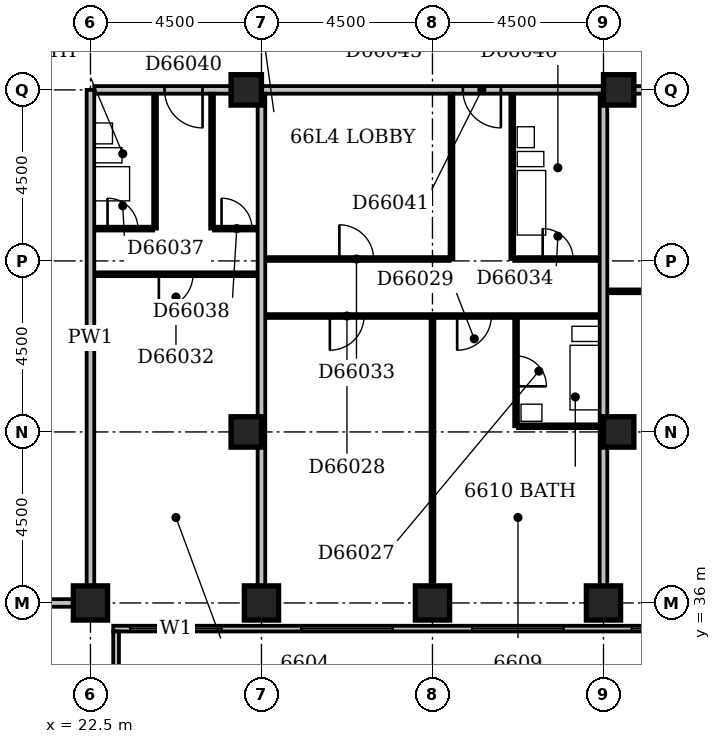
"""IFC4 building model, lengths in metres.
Left out: names, types, materials, properties, quantities, classifications, styles, units other than length and angle.
Written with IfcOpenShell. Run it as: python <this file> out.ifc"""

import sys

from ifc_helpers import new_model, si_unit, direction, frame, frame_2d, origin, origin_2d, place, context, subcontext, project, spatial, rectangle, extrude, element, fill, save


model = new_model("IFC4")
c1 = context("Model", 3, precision=1e-05, world=origin(), true_north=direction((0.0, 1.0)))
c2 = subcontext(c1, "Body", "Model", "MODEL_VIEW")
j1 = project(units=[si_unit("LENGTHUNIT", "METRE"), si_unit("PLANEANGLEUNIT", "RADIAN")], contexts=[c1])
p1 = place(None, origin())
s1 = spatial("IfcSite", under=j1, at=p1, CompositionType="ELEMENT")
p2 = place(p1, origin())
s2 = spatial("IfcBuilding", under=s1, at=p2, CompositionType="ELEMENT")
p3 = place(p2, frame((0.0, 0.0, 254.6)))
s3 = spatial("IfcBuildingStorey", under=s2, at=p3, CompositionType="ELEMENT", Elevation=254.6)
for number, where, z_axis, x_axis in (
    (1, (22.5, 36.0, -0.3), (0.0, 0.0, 1.0), (1.0, 0.0, 0.0)),
    (2, (27.0, 36.0, -0.3), (0.0, 0.0, 1.0), (1.0, 0.0, 0.0)),
    (3, (31.5, 36.0, -0.3), (0.0, 0.0, 1.0), (1.0, 0.0, 0.0)),
    (4, (36.0, 36.0, -0.3), (0.0, 0.0, 1.0), (1.0, 0.0, 0.0)),
):
    element("IfcColumn", number, at=place(p3, frame(where, z_axis=z_axis, x_axis=x_axis)), inside=s3, PredefinedType="COLUMN", context=c2, shape_type="SweptSolid", body=[
        extrude(rectangle(XDim=0.9, YDim=0.9, at=origin_2d()), origin(), (0.0, 0.0, 1.0), 3.45),
    ])
for number, where, z_axis, x_axis in (
    (5, (26.6, 40.5, -0.3), (0.0, 0.0, 1.0), (1.0, 0.0, 0.0)),
    (6, (36.4, 40.5, -0.3), (0.0, 0.0, 1.0), (1.0, 0.0, 0.0)),
    (7, (26.6, 49.5, -0.3), (0.0, 0.0, 1.0), (1.0, 0.0, 0.0)),
    (8, (36.4, 49.5, -0.3), (0.0, 0.0, 1.0), (1.0, 0.0, 0.0)),
):
    element("IfcColumn", number, at=place(p3, frame(where, z_axis=z_axis, x_axis=x_axis)), inside=s3, PredefinedType="COLUMN", context=c2, shape_type="SweptSolid", body=[
        extrude(rectangle(XDim=0.8, YDim=0.8, at=origin_2d()), origin(), (0.0, 0.0, 1.0), 3.45),
    ])
p4 = place(p3, frame((23.175, 17.4, 0.0), z_axis=(0.0, 0.0, 1.0), x_axis=(0.0, 1.0, 0.0)))
e9 = element("IfcWall", 9, at=p4, inside=s3, PredefinedType="STANDARD", context=c2, shape_type="SweptSolid", body=[
    extrude(rectangle(XDim=17.85, YDim=0.15, at=frame_2d((8.925, 0.0))), origin(), (0.0, 0.0, 1.0), 2.7),
])
p5 = place(p4, frame((1.65, 0.0, 0.6)))
e10 = element("IfcOpeningElement", 10, at=p5, cuts=e9, PredefinedType="OPENING", context=c2, shape_type="SweptSolid", body=[
    extrude(rectangle(XDim=2.4, YDim=1.8, at=frame_2d((1.2, 0.9))), frame((0.0, 0.087, 0.0), z_axis=(0.0, -1.0, 0.0), x_axis=(1.0, 0.0, 0.0)), (0.0, 0.0, 1.0), 0.174),
])
p6 = place(p4, frame((6.15, 0.0, 0.6)))
e11 = element("IfcOpeningElement", 11, at=p6, cuts=e9, PredefinedType="OPENING", context=c2, shape_type="SweptSolid", body=[
    extrude(rectangle(XDim=2.4, YDim=1.8, at=frame_2d((1.2, 0.9))), frame((0.0, 0.087, 0.0), z_axis=(0.0, -1.0, 0.0), x_axis=(1.0, 0.0, 0.0)), (0.0, 0.0, 1.0), 0.174),
])
p7 = place(p4, frame((10.65, 0.0, 0.6)))
e12 = element("IfcOpeningElement", 12, at=p7, cuts=e9, PredefinedType="OPENING", context=c2, shape_type="SweptSolid", body=[
    extrude(rectangle(XDim=2.4, YDim=1.8, at=frame_2d((1.2, 0.9))), frame((0.0, 0.087, 0.0), z_axis=(0.0, -1.0, 0.0), x_axis=(1.0, 0.0, 0.0)), (0.0, 0.0, 1.0), 0.174),
])
p8 = place(p4, frame((14.817, 0.0, 0.6)))
e13 = element("IfcOpeningElement", 13, at=p8, cuts=e9, PredefinedType="OPENING", context=c2, shape_type="SweptSolid", body=[
    extrude(rectangle(XDim=0.9, YDim=1.8, at=frame_2d((0.45, 0.9))), frame((0.0, 0.087, 0.0), z_axis=(0.0, -1.0, 0.0), x_axis=(1.0, 0.0, 0.0)), (0.0, 0.0, 1.0), 0.174),
])
p9 = place(p3, frame((23.1, 35.325, 0.0), z_axis=(0.0, 0.0, 1.0), x_axis=(1.0, 0.0, 0.0)))
e14 = element("IfcWall", 14, at=p9, inside=s3, PredefinedType="STANDARD", context=c2, shape_type="SweptSolid", body=[
    extrude(rectangle(XDim=18.15, YDim=0.15, at=frame_2d((9.075, 0.0))), origin(), (0.0, 0.0, 1.0), 2.7),
])
p10 = place(p9, frame((0.45, 0.0, 0.6)))
e15 = element("IfcOpeningElement", 15, at=p10, cuts=e14, PredefinedType="OPENING", context=c2, shape_type="SweptSolid", body=[
    extrude(rectangle(XDim=2.4, YDim=1.8, at=frame_2d((1.2, 0.9))), frame((0.0, 0.087, 0.0), z_axis=(0.0, -1.0, 0.0), x_axis=(1.0, 0.0, 0.0)), (0.0, 0.0, 1.0), 0.174),
])
p11 = place(p9, frame((4.95, 0.0, 0.6)))
e16 = element("IfcOpeningElement", 16, at=p11, cuts=e14, PredefinedType="OPENING", context=c2, shape_type="SweptSolid", body=[
    extrude(rectangle(XDim=2.4, YDim=1.8, at=frame_2d((1.2, 0.9))), frame((0.0, 0.087, 0.0), z_axis=(0.0, -1.0, 0.0), x_axis=(1.0, 0.0, 0.0)), (0.0, 0.0, 1.0), 0.174),
])
p12 = place(p9, frame((9.45, 0.0, 0.6)))
e17 = element("IfcOpeningElement", 17, at=p12, cuts=e14, PredefinedType="OPENING", context=c2, shape_type="SweptSolid", body=[
    extrude(rectangle(XDim=2.4, YDim=1.8, at=frame_2d((1.2, 0.9))), frame((0.0, 0.087, 0.0), z_axis=(0.0, -1.0, 0.0), x_axis=(1.0, 0.0, 0.0)), (0.0, 0.0, 1.0), 0.174),
])
p13 = place(p9, frame((13.646, 0.0, 0.6)))
e18 = element("IfcOpeningElement", 18, at=p13, cuts=e14, PredefinedType="OPENING", context=c2, shape_type="SweptSolid", body=[
    extrude(rectangle(XDim=1.8, YDim=1.8, at=frame_2d((0.9, 0.9))), frame((0.0, 0.087, 0.0), z_axis=(0.0, -1.0, 0.0), x_axis=(1.0, 0.0, 0.0)), (0.0, 0.0, 1.0), 0.174),
])
p14 = place(p3, frame((9.1, 36.0, 0.0), z_axis=(0.0, 0.0, 1.0), x_axis=(1.0, 0.0, 0.0)))
e19 = element("IfcWall", 19, at=p14, inside=s3, PredefinedType="PARTITIONING", context=c2, shape_type="SweptSolid", body=[
    extrude(rectangle(XDim=12.95, YDim=0.2, at=frame_2d((6.475, 0.0))), origin(), (0.0, 0.0, 1.0), 3.15),
])
p15 = place(p3, frame((22.5, 36.45, 0.0), z_axis=(0.0, 0.0, 1.0), x_axis=(0.0, 1.0, 0.0)))
e20 = element("IfcWall", 20, at=p15, inside=s3, PredefinedType="PARTITIONING", context=c2, shape_type="SweptSolid", body=[
    extrude(rectangle(XDim=13.05, YDim=0.2, at=frame_2d((6.525, 0.0))), origin(), (0.0, 0.0, 1.0), 3.15),
])
p16 = place(p3, frame((27.0, 36.45, 0.0), z_axis=(0.0, 0.0, 1.0), x_axis=(0.0, 1.0, 0.0)))
e21 = element("IfcWall", 21, at=p16, inside=s3, PredefinedType="PARTITIONING", context=c2, shape_type="SweptSolid", body=[
    extrude(rectangle(XDim=12.95, YDim=0.2, at=frame_2d((6.475, 0.0))), origin(), (0.0, 0.0, 1.0), 3.15),
])
p17 = place(p3, frame((31.5, 36.45, 0.0), z_axis=(0.0, 0.0, 1.0), x_axis=(0.0, 1.0, 0.0)))
e22 = element("IfcWall", 22, at=p17, inside=s3, PredefinedType="PARTITIONING", context=c2, shape_type="SweptSolid", body=[
    extrude(rectangle(XDim=7.05, YDim=0.1, at=frame_2d((3.525, 0.0))), origin(), (0.0, 0.0, 1.0), 3.15),
])
p18 = place(p3, frame((36.0, 36.45, 0.0), z_axis=(0.0, 0.0, 1.0), x_axis=(0.0, 1.0, 0.0)))
e23 = element("IfcWall", 23, at=p18, inside=s3, PredefinedType="PARTITIONING", context=c2, shape_type="SweptSolid", body=[
    extrude(rectangle(XDim=12.95, YDim=0.2, at=frame_2d((6.475, 0.0))), origin(), (0.0, 0.0, 1.0), 3.15),
])
p19 = place(p3, frame((33.7, 40.65, 0.0), z_axis=(0.0, 0.0, 1.0), x_axis=(0.0, 1.0, 0.0)))
e24 = element("IfcWall", 24, at=p19, inside=s3, PredefinedType="PLUMBINGWALL", context=c2, shape_type="SweptSolid", body=[
    extrude(rectangle(XDim=2.85, YDim=0.1, at=frame_2d((1.425, 0.0))), origin(), (0.0, 0.0, 1.0), 3.15),
])
p20 = place(p19, frame((1.05, 0.0, 0.0)))
e25 = element("IfcOpeningElement", 25, at=p20, cuts=e24, PredefinedType="OPENING", context=c2, shape_type="SweptSolid", body=[
    extrude(rectangle(XDim=0.8, YDim=2.1, at=frame_2d((0.4, 1.05))), frame((0.0, 0.062, 0.0), z_axis=(0.0, -1.0, 0.0), x_axis=(1.0, 0.0, 0.0)), (0.0, 0.0, 1.0), 0.124),
])
p21 = place(p3, frame((33.75, 40.65, 0.0), z_axis=(0.0, 0.0, 1.0), x_axis=(1.0, 0.0, 0.0)))
e26 = element("IfcWall", 26, at=p21, inside=s3, PredefinedType="PLUMBINGWALL", context=c2, shape_type="SweptSolid", body=[
    extrude(rectangle(XDim=2.15, YDim=0.1, at=frame_2d((1.075, 0.0))), origin(), (0.0, 0.0, 1.0), 3.15),
])
p22 = place(p3, frame((27.1, 43.55, 0.0), z_axis=(0.0, 0.0, 1.0), x_axis=(1.0, 0.0, 0.0)))
e27 = element("IfcWall", 27, at=p22, inside=s3, PredefinedType="PARTITIONING", context=c2, shape_type="SweptSolid", body=[
    extrude(rectangle(XDim=8.8, YDim=0.1, at=frame_2d((4.4, 0.0))), origin(), (0.0, 0.0, 1.0), 3.15),
])
p23 = place(p22, frame((1.7, 0.0, 0.0)))
e28 = element("IfcOpeningElement", 28, at=p23, cuts=e27, PredefinedType="OPENING", context=c2, shape_type="SweptSolid", body=[
    extrude(rectangle(XDim=0.9, YDim=2.1, at=frame_2d((0.45, 1.05))), frame((0.0, 0.062, 0.0), z_axis=(0.0, -1.0, 0.0), x_axis=(1.0, 0.0, 0.0)), (0.0, 0.0, 1.0), 0.124),
])
p24 = place(p22, frame((5.05, 0.0, 0.0)))
e29 = element("IfcOpeningElement", 29, at=p24, cuts=e27, PredefinedType="OPENING", context=c2, shape_type="SweptSolid", body=[
    extrude(rectangle(XDim=0.9, YDim=2.1, at=frame_2d((0.45, 1.05))), frame((0.0, 0.062, 0.0), z_axis=(0.0, -1.0, 0.0), x_axis=(1.0, 0.0, 0.0)), (0.0, 0.0, 1.0), 0.124),
])
p25 = place(p3, frame((36.1, 44.2, 0.0), z_axis=(0.0, 0.0, 1.0), x_axis=(1.0, 0.0, 0.0)))
e30 = element("IfcWall", 30, at=p25, inside=s3, PredefinedType="PARTITIONING", context=c2, shape_type="SweptSolid", body=[
    extrude(rectangle(XDim=9.5, YDim=0.1, at=frame_2d((4.75, 0.0))), origin(), (0.0, 0.0, 1.0), 3.15),
])
p26 = place(p25, frame((1.7, 0.0, 0.0)))
e31 = element("IfcOpeningElement", 31, at=p26, cuts=e30, PredefinedType="OPENING", context=c2, shape_type="SweptSolid", body=[
    extrude(rectangle(XDim=0.9, YDim=2.1, at=frame_2d((0.45, 1.05))), frame((0.0, 0.062, 0.0), z_axis=(0.0, -1.0, 0.0), x_axis=(1.0, 0.0, 0.0)), (0.0, 0.0, 1.0), 0.124),
])
p27 = place(p25, frame((6.2, 0.0, 0.0)))
e32 = element("IfcOpeningElement", 32, at=p27, cuts=e30, PredefinedType="OPENING", context=c2, shape_type="SweptSolid", body=[
    extrude(rectangle(XDim=0.9, YDim=2.1, at=frame_2d((0.45, 1.05))), frame((0.0, 0.062, 0.0), z_axis=(0.0, -1.0, 0.0), x_axis=(1.0, 0.0, 0.0)), (0.0, 0.0, 1.0), 0.124),
])
p28 = place(p3, frame((22.6, 44.65, 0.0), z_axis=(0.0, 0.0, 1.0), x_axis=(1.0, 0.0, 0.0)))
e33 = element("IfcWall", 33, at=p28, inside=s3, PredefinedType="PARTITIONING", context=c2, shape_type="SweptSolid", body=[
    extrude(rectangle(XDim=4.3, YDim=0.1, at=frame_2d((2.15, 0.0))), origin(), (0.0, 0.0, 1.0), 3.15),
])
p29 = place(p28, frame((1.7, 0.0, 0.0)))
e34 = element("IfcOpeningElement", 34, at=p29, cuts=e33, PredefinedType="OPENING", context=c2, shape_type="SweptSolid", body=[
    extrude(rectangle(XDim=0.9, YDim=2.1, at=frame_2d((0.45, 1.05))), frame((0.0, 0.062, 0.0), z_axis=(0.0, -1.0, 0.0), x_axis=(1.0, 0.0, 0.0)), (0.0, 0.0, 1.0), 0.124),
])
p30 = place(p3, frame((27.1, 45.05, 0.0), z_axis=(0.0, 0.0, 1.0), x_axis=(1.0, 0.0, 0.0)))
e35 = element("IfcWall", 35, at=p30, inside=s3, PredefinedType="PARTITIONING", context=c2, shape_type="SweptSolid", body=[
    extrude(rectangle(XDim=4.85, YDim=0.1, at=frame_2d((2.425, 0.0))), origin(), (0.0, 0.0, 1.0), 3.15),
])
p31 = place(p30, frame((1.95, 0.0, 0.0)))
e36 = element("IfcOpeningElement", 36, at=p31, cuts=e35, PredefinedType="OPENING", context=c2, shape_type="SweptSolid", body=[
    extrude(rectangle(XDim=0.9, YDim=2.1, at=frame_2d((0.45, 1.05))), frame((0.0, 0.062, 0.0), z_axis=(0.0, -1.0, 0.0), x_axis=(1.0, 0.0, 0.0)), (0.0, 0.0, 1.0), 0.124),
])
p32 = place(p3, frame((32.0, 45.05, 0.0), z_axis=(0.0, 0.0, 1.0), x_axis=(0.0, 1.0, 0.0)))
e37 = element("IfcWall", 37, at=p32, inside=s3, PredefinedType="PARTITIONING", context=c2, shape_type="SweptSolid", body=[
    extrude(rectangle(XDim=4.35, YDim=0.1, at=frame_2d((2.175, 0.0))), origin(), (0.0, 0.0, 1.0), 3.15),
])
p33 = place(p3, frame((33.6, 45.05, 0.0), z_axis=(0.0, 0.0, 1.0), x_axis=(0.0, 1.0, 0.0)))
e38 = element("IfcWall", 38, at=p33, inside=s3, PredefinedType="PLUMBINGWALL", context=c2, shape_type="SweptSolid", body=[
    extrude(rectangle(XDim=4.35, YDim=0.1, at=frame_2d((2.175, 0.0))), origin(), (0.0, 0.0, 1.0), 3.15),
])
p34 = place(p3, frame((33.65, 45.05, 0.0), z_axis=(0.0, 0.0, 1.0), x_axis=(1.0, 0.0, 0.0)))
e39 = element("IfcWall", 39, at=p34, inside=s3, PredefinedType="PARTITIONING", context=c2, shape_type="SweptSolid", body=[
    extrude(rectangle(XDim=2.25, YDim=0.1, at=frame_2d((1.125, 0.0))), origin(), (0.0, 0.0, 1.0), 3.15),
])
p35 = place(p34, frame((0.75, 0.0, 0.0)))
e40 = element("IfcOpeningElement", 40, at=p35, cuts=e39, PredefinedType="OPENING", context=c2, shape_type="SweptSolid", body=[
    extrude(rectangle(XDim=0.8, YDim=2.1, at=frame_2d((0.4, 1.05))), frame((0.0, 0.062, 0.0), z_axis=(0.0, -1.0, 0.0), x_axis=(1.0, 0.0, 0.0)), (0.0, 0.0, 1.0), 0.124),
])
p36 = place(p3, frame((22.6, 45.85, 0.0), z_axis=(0.0, 0.0, 1.0), x_axis=(1.0, 0.0, 0.0)))
e41 = element("IfcWall", 41, at=p36, inside=s3, PredefinedType="PARTITIONING", context=c2, shape_type="SweptSolid", body=[
    extrude(rectangle(XDim=1.55, YDim=0.1, at=frame_2d((0.775, 0.0))), origin(), (0.0, 0.0, 1.0), 3.15),
])
p37 = place(p36, frame((0.35, 0.0, 0.0)))
e42 = element("IfcOpeningElement", 42, at=p37, cuts=e41, PredefinedType="OPENING", context=c2, shape_type="SweptSolid", body=[
    extrude(rectangle(XDim=0.8, YDim=2.1, at=frame_2d((0.4, 1.05))), frame((0.0, 0.062, 0.0), z_axis=(0.0, -1.0, 0.0), x_axis=(1.0, 0.0, 0.0)), (0.0, 0.0, 1.0), 0.124),
])
p38 = place(p3, frame((24.2, 45.85, 0.0), z_axis=(0.0, 0.0, 1.0), x_axis=(0.0, 1.0, 0.0)))
e43 = element("IfcWall", 43, at=p38, inside=s3, PredefinedType="PLUMBINGWALL", context=c2, shape_type="SweptSolid", body=[
    extrude(rectangle(XDim=3.55, YDim=0.1, at=frame_2d((1.775, 0.0))), origin(), (0.0, 0.0, 1.0), 3.15),
])
p39 = place(p3, frame((25.7, 45.85, 0.0), z_axis=(0.0, 0.0, 1.0), x_axis=(0.0, 1.0, 0.0)))
e44 = element("IfcWall", 44, at=p39, inside=s3, PredefinedType="PARTITIONING", context=c2, shape_type="SweptSolid", body=[
    extrude(rectangle(XDim=3.55, YDim=0.1, at=frame_2d((1.775, 0.0))), origin(), (0.0, 0.0, 1.0), 3.15),
])
p40 = place(p3, frame((25.75, 45.85, 0.0), z_axis=(0.0, 0.0, 1.0), x_axis=(1.0, 0.0, 0.0)))
e45 = element("IfcWall", 45, at=p40, inside=s3, PredefinedType="PARTITIONING", context=c2, shape_type="SweptSolid", body=[
    extrude(rectangle(XDim=1.15, YDim=0.1, at=frame_2d((0.575, 0.0))), origin(), (0.0, 0.0, 1.0), 3.15),
])
p41 = place(p40, frame((0.2, 0.0, 0.0)))
e46 = element("IfcOpeningElement", 46, at=p41, cuts=e45, PredefinedType="OPENING", context=c2, shape_type="SweptSolid", body=[
    extrude(rectangle(XDim=0.8, YDim=2.1, at=frame_2d((0.4, 1.05))), frame((0.0, 0.062, 0.0), z_axis=(0.0, -1.0, 0.0), x_axis=(1.0, 0.0, 0.0)), (0.0, 0.0, 1.0), 0.124),
])
p42 = place(p3, frame((22.6, 49.5, 0.0), z_axis=(0.0, 0.0, 1.0), x_axis=(1.0, 0.0, 0.0)))
e47 = element("IfcWall", 47, at=p42, inside=s3, PredefinedType="PARTITIONING", context=c2, shape_type="SweptSolid", body=[
    extrude(rectangle(XDim=21.95, YDim=0.2, at=frame_2d((10.975, 0.0))), origin(), (0.0, 0.0, 1.0), 3.15),
])
p43 = place(p42, frame((1.85, 0.0, 0.0)))
e48 = element("IfcOpeningElement", 48, at=p43, cuts=e47, PredefinedType="OPENING", context=c2, shape_type="SweptSolid", body=[
    extrude(rectangle(XDim=1.0, YDim=2.1, at=frame_2d((0.5, 1.05))), frame((0.0, 0.112, 0.0), z_axis=(0.0, -1.0, 0.0), x_axis=(1.0, 0.0, 0.0)), (0.0, 0.0, 1.0), 0.224),
])
p44 = place(p42, frame((9.7, 0.0, 0.0)))
e49 = element("IfcOpeningElement", 49, at=p44, cuts=e47, PredefinedType="OPENING", context=c2, shape_type="SweptSolid", body=[
    extrude(rectangle(XDim=1.0, YDim=2.1, at=frame_2d((0.5, 1.05))), frame((0.0, 0.112, 0.0), z_axis=(0.0, -1.0, 0.0), x_axis=(1.0, 0.0, 0.0)), (0.0, 0.0, 1.0), 0.224),
])
p45 = place(p42, frame((15.05, 0.0, 0.0)))
e50 = element("IfcOpeningElement", 50, at=p45, cuts=e47, PredefinedType="OPENING", context=c2, shape_type="SweptSolid", body=[
    extrude(rectangle(XDim=1.0, YDim=2.1, at=frame_2d((0.5, 1.05))), frame((0.0, 0.112, 0.0), z_axis=(0.0, -1.0, 0.0), x_axis=(1.0, 0.0, 0.0)), (0.0, 0.0, 1.0), 0.224),
])
p46 = place(p10, origin())
e51 = element("IfcWindow", 51, at=p46, inside=s3, PartitioningType="SINGLE_PANEL", PredefinedType="WINDOW", context=c2, shape_type="SweptSolid", body=[
    extrude(rectangle(XDim=2.4, YDim=1.8, at=frame_2d((1.2, 0.9))), frame((0.0, 0.03, 0.0), z_axis=(0.0, -1.0, 0.0), x_axis=(1.0, 0.0, 0.0)), (0.0, 0.0, 1.0), 0.06),
])
fill(e15, e51)
p47 = place(p11, origin())
e52 = element("IfcWindow", 52, at=p47, inside=s3, PartitioningType="SINGLE_PANEL", PredefinedType="WINDOW", context=c2, shape_type="SweptSolid", body=[
    extrude(rectangle(XDim=2.4, YDim=1.8, at=frame_2d((1.2, 0.9))), frame((0.0, 0.03, 0.0), z_axis=(0.0, -1.0, 0.0), x_axis=(1.0, 0.0, 0.0)), (0.0, 0.0, 1.0), 0.06),
])
fill(e16, e52)
p48 = place(p12, origin())
e53 = element("IfcWindow", 53, at=p48, inside=s3, PartitioningType="SINGLE_PANEL", PredefinedType="WINDOW", context=c2, shape_type="SweptSolid", body=[
    extrude(rectangle(XDim=2.4, YDim=1.8, at=frame_2d((1.2, 0.9))), frame((0.0, 0.03, 0.0), z_axis=(0.0, -1.0, 0.0), x_axis=(1.0, 0.0, 0.0)), (0.0, 0.0, 1.0), 0.06),
])
fill(e17, e53)
p49 = place(p13, origin())
e54 = element("IfcWindow", 54, at=p49, inside=s3, PartitioningType="SINGLE_PANEL", PredefinedType="WINDOW", context=c2, shape_type="SweptSolid", body=[
    extrude(rectangle(XDim=1.8, YDim=1.8, at=frame_2d((0.9, 0.9))), frame((0.0, 0.03, 0.0), z_axis=(0.0, -1.0, 0.0), x_axis=(1.0, 0.0, 0.0)), (0.0, 0.0, 1.0), 0.06),
])
fill(e18, e54)
p50 = place(p20, frame((0.8, 0.0, 0.0), z_axis=(0.0, 0.0, 1.0), x_axis=(-1.0, 0.0, 0.0)))
e55 = element("IfcDoor", 55, at=p50, inside=s3, OperationType="SINGLE_SWING_RIGHT", PredefinedType="DOOR", context=c2, shape_type="SweptSolid", body=[
    extrude(rectangle(XDim=0.8, YDim=2.1, at=frame_2d((0.4, 1.05))), frame((0.0, 0.025, 0.0), z_axis=(0.0, -1.0, 0.0), x_axis=(1.0, 0.0, 0.0)), (0.0, 0.0, 1.0), 0.05),
])
fill(e25, e55)
p51 = place(p23, frame((0.9, 0.0, 0.0), z_axis=(0.0, 0.0, 1.0), x_axis=(-1.0, 0.0, 0.0)))
e56 = element("IfcDoor", 56, at=p51, inside=s3, OperationType="SINGLE_SWING_RIGHT", PredefinedType="DOOR", context=c2, shape_type="SweptSolid", body=[
    extrude(rectangle(XDim=0.9, YDim=2.1, at=frame_2d((0.45, 1.05))), frame((0.0, 0.025, 0.0), z_axis=(0.0, -1.0, 0.0), x_axis=(1.0, 0.0, 0.0)), (0.0, 0.0, 1.0), 0.05),
])
fill(e28, e56)
p52 = place(p24, frame((0.9, 0.0, 0.0), z_axis=(0.0, 0.0, 1.0), x_axis=(-1.0, 0.0, 0.0)))
e57 = element("IfcDoor", 57, at=p52, inside=s3, OperationType="SINGLE_SWING_RIGHT", PredefinedType="DOOR", context=c2, shape_type="SweptSolid", body=[
    extrude(rectangle(XDim=0.9, YDim=2.1, at=frame_2d((0.45, 1.05))), frame((0.0, 0.025, 0.0), z_axis=(0.0, -1.0, 0.0), x_axis=(1.0, 0.0, 0.0)), (0.0, 0.0, 1.0), 0.05),
])
fill(e29, e57)
p53 = place(p29, frame((0.9, 0.0, 0.0), z_axis=(0.0, 0.0, 1.0), x_axis=(-1.0, 0.0, 0.0)))
e58 = element("IfcDoor", 58, at=p53, inside=s3, OperationType="SINGLE_SWING_RIGHT", PredefinedType="DOOR", context=c2, shape_type="SweptSolid", body=[
    extrude(rectangle(XDim=0.9, YDim=2.1, at=frame_2d((0.45, 1.05))), frame((0.0, 0.025, 0.0), z_axis=(0.0, -1.0, 0.0), x_axis=(1.0, 0.0, 0.0)), (0.0, 0.0, 1.0), 0.05),
])
fill(e34, e58)
p54 = place(p31, origin())
e59 = element("IfcDoor", 59, at=p54, inside=s3, OperationType="SINGLE_SWING_LEFT", PredefinedType="DOOR", context=c2, shape_type="SweptSolid", body=[
    extrude(rectangle(XDim=0.9, YDim=2.1, at=frame_2d((0.45, 1.05))), frame((0.0, 0.025, 0.0), z_axis=(0.0, -1.0, 0.0), x_axis=(1.0, 0.0, 0.0)), (0.0, 0.0, 1.0), 0.05),
])
fill(e36, e59)
p55 = place(p35, origin())
e60 = element("IfcDoor", 60, at=p55, inside=s3, OperationType="SINGLE_SWING_LEFT", PredefinedType="DOOR", context=c2, shape_type="SweptSolid", body=[
    extrude(rectangle(XDim=0.8, YDim=2.1, at=frame_2d((0.4, 1.05))), frame((0.0, 0.025, 0.0), z_axis=(0.0, -1.0, 0.0), x_axis=(1.0, 0.0, 0.0)), (0.0, 0.0, 1.0), 0.05),
])
fill(e40, e60)
p56 = place(p37, origin())
e61 = element("IfcDoor", 61, at=p56, inside=s3, OperationType="SINGLE_SWING_LEFT", PredefinedType="DOOR", context=c2, shape_type="SweptSolid", body=[
    extrude(rectangle(XDim=0.8, YDim=2.1, at=frame_2d((0.4, 1.05))), frame((0.0, 0.025, 0.0), z_axis=(0.0, -1.0, 0.0), x_axis=(1.0, 0.0, 0.0)), (0.0, 0.0, 1.0), 0.05),
])
fill(e42, e61)
p57 = place(p41, origin())
e62 = element("IfcDoor", 62, at=p57, inside=s3, OperationType="SINGLE_SWING_LEFT", PredefinedType="DOOR", context=c2, shape_type="SweptSolid", body=[
    extrude(rectangle(XDim=0.8, YDim=2.1, at=frame_2d((0.4, 1.05))), frame((0.0, 0.025, 0.0), z_axis=(0.0, -1.0, 0.0), x_axis=(1.0, 0.0, 0.0)), (0.0, 0.0, 1.0), 0.05),
])
fill(e46, e62)
p58 = place(p43, origin())
e63 = element("IfcDoor", 63, at=p58, inside=s3, OperationType="SINGLE_SWING_RIGHT", PredefinedType="DOOR", context=c2, shape_type="SweptSolid", body=[
    extrude(rectangle(XDim=1.0, YDim=2.1, at=frame_2d((0.5, 1.05))), frame((0.0, 0.025, 0.0), z_axis=(0.0, -1.0, 0.0), x_axis=(1.0, 0.0, 0.0)), (0.0, 0.0, 1.0), 0.05),
])
fill(e48, e63)
p59 = place(p44, origin())
e64 = element("IfcDoor", 64, at=p59, inside=s3, OperationType="SINGLE_SWING_RIGHT", PredefinedType="DOOR", context=c2, shape_type="SweptSolid", body=[
    extrude(rectangle(XDim=1.0, YDim=2.1, at=frame_2d((0.5, 1.05))), frame((0.0, 0.025, 0.0), z_axis=(0.0, -1.0, 0.0), x_axis=(1.0, 0.0, 0.0)), (0.0, 0.0, 1.0), 0.05),
])
fill(e49, e64)
save(model, sys.argv[1])
